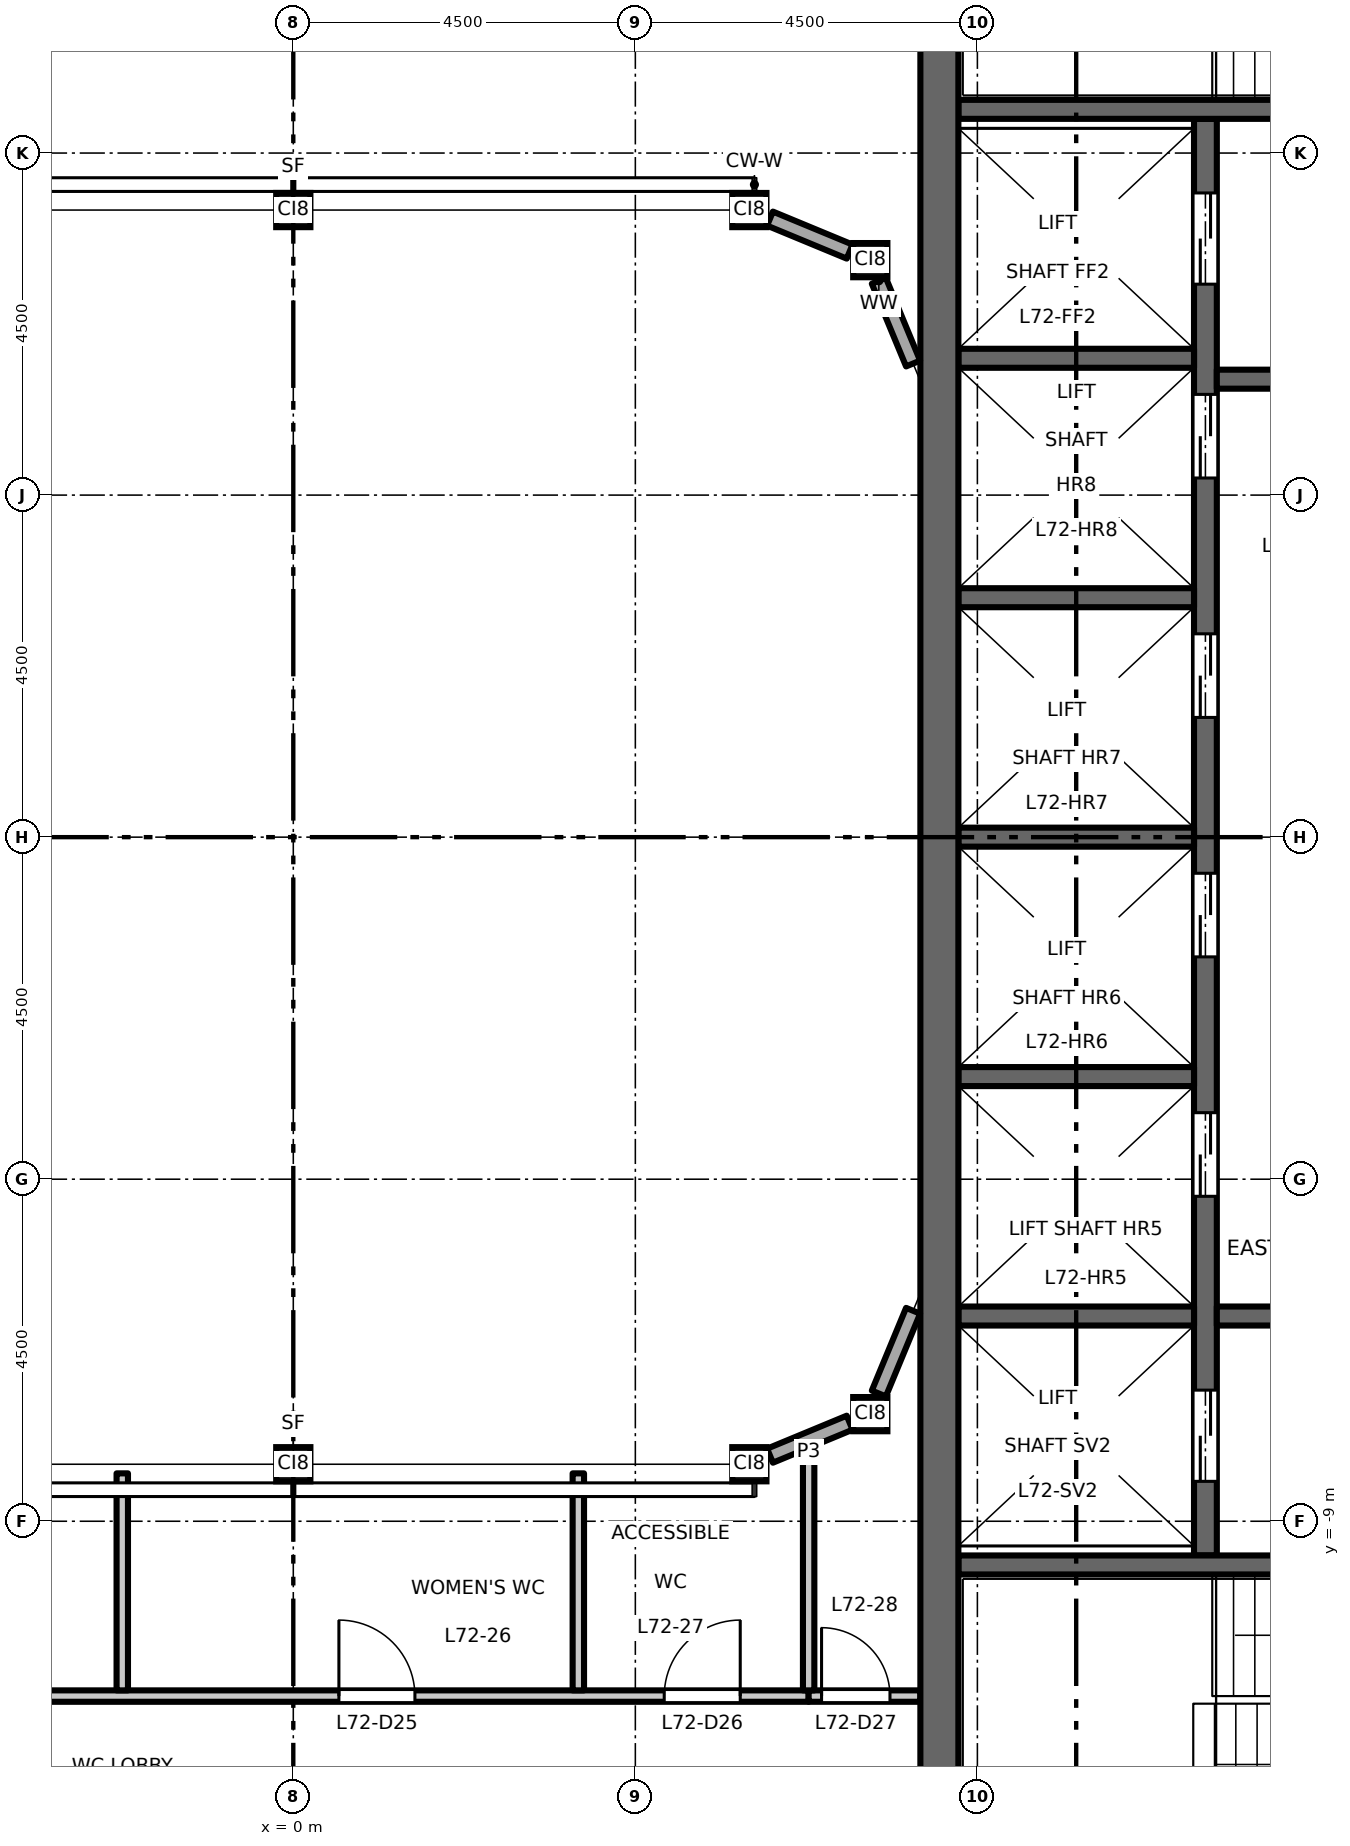
"""IFC4 building model, lengths in metres.
Left out: names, types, materials, properties, quantities, classifications, styles, units other than length and angle.
Written with IfcOpenShell. Run it as: python <this file> out.ifc"""

import sys

from ifc_helpers import new_model, si_unit, direction, frame, frame_2d, origin, origin_2d, place, context, subcontext, project, spatial, rectangle, hollow_rectangle, extrude, element, fill, save


model = new_model("IFC4")
c1 = context("Model", 3, precision=1e-05, world=origin(), true_north=direction((0.0, 1.0)))
c2 = subcontext(c1, "Body", "Model", "MODEL_VIEW")
j1 = project(units=[si_unit("LENGTHUNIT", "METRE"), si_unit("PLANEANGLEUNIT", "RADIAN")], contexts=[c1])
p1 = place(None, origin())
s1 = spatial("IfcSite", under=j1, at=p1, CompositionType="ELEMENT")
p2 = place(p1, origin())
s2 = spatial("IfcBuilding", under=s1, at=p2, CompositionType="ELEMENT")
p3 = place(p2, frame((0.0, 0.0, 334.7)))
s3 = spatial("IfcBuildingStorey", under=s2, at=p3, CompositionType="ELEMENT", Elevation=334.7)
for number, where, z_axis, x_axis in (
    (1, (0.0, -8.25, 0.0), (0.0, 0.0, 1.0), (1.0, 0.0, 0.0)),
    (2, (6.0, -8.25, 0.0), (0.0, 0.0, 1.0), (1.0, 0.0, 0.0)),
    (3, (7.591, -7.591, 0.0), (0.0, 0.0, 1.0), (1.0, 0.0, 0.0)),
    (4, (0.0, 8.25, 0.0), (0.0, 0.0, 1.0), (1.0, 0.0, 0.0)),
    (5, (6.0, 8.25, 0.0), (0.0, 0.0, 1.0), (1.0, 0.0, 0.0)),
    (6, (7.591, 7.591, 0.0), (0.0, 0.0, 1.0), (1.0, 0.0, 0.0)),
):
    element("IfcColumn", number, at=place(p3, frame(where, z_axis=z_axis, x_axis=x_axis)), inside=s3, PredefinedType="COLUMN", context=c2, shape_type="SweptSolid", body=[
        extrude(hollow_rectangle(XDim=0.45, YDim=0.45, WallThickness=0.022, at=origin_2d()), origin(), (0.0, 0.0, 1.0), 4.5),
    ])
p4 = place(p3, frame((12.0, -9.45, 0.0), z_axis=(0.0, 0.0, 1.0), x_axis=(0.0, 1.0, 0.0)))
e7 = element("IfcWall", 7, at=p4, inside=s3, PredefinedType="SHEAR", context=c2, shape_type="SweptSolid", body=[
    extrude(rectangle(XDim=18.9, YDim=0.3, at=frame_2d((9.45, 0.0))), origin(), (0.0, 0.0, 1.0), 4.35),
])
p5 = place(p4, frame((4.725, 0.0, 0.0)))
e8 = element("IfcOpeningElement", 8, at=p5, cuts=e7, PredefinedType="OPENING", context=c2, shape_type="SweptSolid", body=[
    extrude(rectangle(XDim=1.1, YDim=2.1, at=frame_2d((0.55, 1.05))), frame((0.0, 0.16, 0.0), z_axis=(0.0, -1.0, 0.0), x_axis=(1.0, 0.0, 0.0)), (0.0, 0.0, 1.0), 0.32),
])
p6 = place(p4, frame((7.875, 0.0, 0.0)))
e9 = element("IfcOpeningElement", 9, at=p6, cuts=e7, PredefinedType="OPENING", context=c2, shape_type="SweptSolid", body=[
    extrude(rectangle(XDim=1.1, YDim=2.1, at=frame_2d((0.55, 1.05))), frame((0.0, 0.16, 0.0), z_axis=(0.0, -1.0, 0.0), x_axis=(1.0, 0.0, 0.0)), (0.0, 0.0, 1.0), 0.32),
])
p7 = place(p4, frame((11.025, 0.0, 0.0)))
e10 = element("IfcOpeningElement", 10, at=p7, cuts=e7, PredefinedType="OPENING", context=c2, shape_type="SweptSolid", body=[
    extrude(rectangle(XDim=1.1, YDim=2.1, at=frame_2d((0.55, 1.05))), frame((0.0, 0.16, 0.0), z_axis=(0.0, -1.0, 0.0), x_axis=(1.0, 0.0, 0.0)), (0.0, 0.0, 1.0), 0.32),
])
p8 = place(p4, frame((14.175, 0.0, 0.0)))
e11 = element("IfcOpeningElement", 11, at=p8, cuts=e7, PredefinedType="OPENING", context=c2, shape_type="SweptSolid", body=[
    extrude(rectangle(XDim=1.1, YDim=2.1, at=frame_2d((0.55, 1.05))), frame((0.0, 0.16, 0.0), z_axis=(0.0, -1.0, 0.0), x_axis=(1.0, 0.0, 0.0)), (0.0, 0.0, 1.0), 0.32),
])
p9 = place(p4, frame((16.725, 0.0, 0.0)))
e12 = element("IfcOpeningElement", 12, at=p9, cuts=e7, PredefinedType="OPENING", context=c2, shape_type="SweptSolid", body=[
    extrude(rectangle(XDim=1.2, YDim=2.1, at=frame_2d((0.6, 1.05))), frame((0.0, 0.16, 0.0), z_axis=(0.0, -1.0, 0.0), x_axis=(1.0, 0.0, 0.0)), (0.0, 0.0, 1.0), 0.32),
])
p10 = place(p4, frame((0.975, 0.0, 0.0)))
e13 = element("IfcOpeningElement", 13, at=p10, cuts=e7, PredefinedType="OPENING", context=c2, shape_type="SweptSolid", body=[
    extrude(rectangle(XDim=1.2, YDim=2.1, at=frame_2d((0.6, 1.05))), frame((0.0, 0.16, 0.0), z_axis=(0.0, -1.0, 0.0), x_axis=(1.0, 0.0, 0.0)), (0.0, 0.0, 1.0), 0.32),
])
p11 = place(p3, frame((12.15, 6.025, 0.0), z_axis=(0.0, 0.0, 1.0), x_axis=(1.0, 0.0, 0.0)))
e14 = element("IfcWall", 14, at=p11, inside=s3, PredefinedType="SHEAR", context=c2, shape_type="SweptSolid", body=[
    extrude(rectangle(XDim=4.6, YDim=0.25, at=frame_2d((2.3, 0.0))), origin(), (0.0, 0.0, 1.0), 4.35),
])
p12 = place(p11, frame((1.8, 0.0, 0.0)))
e15 = element("IfcOpeningElement", 15, at=p12, cuts=e14, PredefinedType="OPENING", context=c2, shape_type="SweptSolid", body=[
    extrude(rectangle(XDim=1.0, YDim=2.1, at=frame_2d((0.5, 1.05))), frame((0.0, 0.135, 0.0), z_axis=(0.0, -1.0, 0.0), x_axis=(1.0, 0.0, 0.0)), (0.0, 0.0, 1.0), 0.27),
])
p13 = place(p3, frame((12.15, -6.3, 0.0), z_axis=(0.0, 0.0, 1.0), x_axis=(1.0, 0.0, 0.0)))
e16 = element("IfcWall", 16, at=p13, inside=s3, PredefinedType="SHEAR", context=c2, shape_type="SweptSolid", body=[
    extrude(rectangle(XDim=4.6, YDim=0.25, at=frame_2d((2.3, 0.0))), origin(), (0.0, 0.0, 1.0), 4.35),
])
p14 = place(p13, frame((1.8, 0.0, 0.0)))
e17 = element("IfcOpeningElement", 17, at=p14, cuts=e16, PredefinedType="OPENING", context=c2, shape_type="SweptSolid", body=[
    extrude(rectangle(XDim=1.0, YDim=2.1, at=frame_2d((0.5, 1.05))), frame((0.0, 0.135, 0.0), z_axis=(0.0, -1.0, 0.0), x_axis=(1.0, 0.0, 0.0)), (0.0, 0.0, 1.0), 0.27),
])
for number, where, z_axis, x_axis in (
    (18, (8.75, 0.0, 0.0), (0.0, 0.0, 1.0), (1.0, 0.0, 0.0)),
    (19, (8.75, 3.15, 0.0), (0.0, 0.0, 1.0), (1.0, 0.0, 0.0)),
    (20, (8.75, 6.3, 0.0), (0.0, 0.0, 1.0), (1.0, 0.0, 0.0)),
    (21, (8.75, -3.15, 0.0), (0.0, 0.0, 1.0), (1.0, 0.0, 0.0)),
    (22, (8.75, -6.3, 0.0), (0.0, 0.0, 1.0), (1.0, 0.0, 0.0)),
):
    element("IfcWall", number, at=place(p3, frame(where, z_axis=z_axis, x_axis=x_axis)), inside=s3, PredefinedType="SHEAR", context=c2, shape_type="SweptSolid", body=[
        extrude(rectangle(XDim=3.1, YDim=0.25, at=frame_2d((1.55, 0.0))), origin(), (0.0, 0.0, 1.0), 4.35),
    ])
p15 = place(p3, frame((8.75, 9.575, 0.0), z_axis=(0.0, 0.0, 1.0), x_axis=(1.0, 0.0, 0.0)))
e23 = element("IfcWall", 23, at=p15, inside=s3, PredefinedType="SHEAR", context=c2, shape_type="SweptSolid", body=[
    extrude(rectangle(XDim=8.0, YDim=0.25, at=frame_2d((4.0, 0.0))), origin(), (0.0, 0.0, 1.0), 4.35),
])
p16 = place(p15, frame((6.65, 0.0, 0.0)))
e24 = element("IfcOpeningElement", 24, at=p16, cuts=e23, PredefinedType="OPENING", context=c2, shape_type="SweptSolid", body=[
    extrude(rectangle(XDim=1.1, YDim=2.1, at=frame_2d((0.55, 1.05))), frame((0.0, 0.135, 0.0), z_axis=(0.0, -1.0, 0.0), x_axis=(1.0, 0.0, 0.0)), (0.0, 0.0, 1.0), 0.27),
])
p17 = place(p3, frame((8.75, -9.575, 0.0), z_axis=(0.0, 0.0, 1.0), x_axis=(1.0, 0.0, 0.0)))
e25 = element("IfcWall", 25, at=p17, inside=s3, PredefinedType="SHEAR", context=c2, shape_type="SweptSolid", body=[
    extrude(rectangle(XDim=8.0, YDim=0.25, at=frame_2d((4.0, 0.0))), origin(), (0.0, 0.0, 1.0), 4.35),
])
p18 = place(p17, frame((6.65, 0.0, 0.0)))
e26 = element("IfcOpeningElement", 26, at=p18, cuts=e25, PredefinedType="OPENING", context=c2, shape_type="SweptSolid", body=[
    extrude(rectangle(XDim=1.1, YDim=2.1, at=frame_2d((0.55, 1.05))), frame((0.0, 0.135, 0.0), z_axis=(0.0, -1.0, 0.0), x_axis=(1.0, 0.0, 0.0)), (0.0, 0.0, 1.0), 0.27),
])
p19 = place(p3, frame((8.5, -13.0, 0.0), z_axis=(0.0, 0.0, 1.0), x_axis=(0.0, 1.0, 0.0)))
e27 = element("IfcWall", 27, at=p19, inside=s3, PredefinedType="SHEAR", context=c2, shape_type="SweptSolid", body=[
    extrude(rectangle(XDim=26.0, YDim=0.5, at=frame_2d((13.0, 0.0))), origin(), (0.0, 0.0, 1.0), 4.35),
])
p20 = place(p3, frame((6.271, -8.137, 0.0), z_axis=(0.0, 0.0, 1.0), x_axis=(0.923864661962, 0.382719331074, 0.0)))
e28 = element("IfcWall", 28, at=p20, inside=s3, PredefinedType="STANDARD", context=c2, shape_type="SweptSolid", body=[
    extrude(rectangle(XDim=1.134, YDim=0.2, at=frame_2d((0.567, 0.0))), origin(), (0.0, 0.0, 1.0), 4.01),
])
for number, where, z_axis, x_axis in (
    (29, (7.703, -7.319, 0.0), (0.0, 0.0, 1.0), (0.383, 0.924, 0.0)),
    (30, (8.154, 6.231, 0.0), (0.0, 0.0, 1.0), (-0.383, 0.924, 0.0)),
):
    element("IfcWall", number, at=place(p3, frame(where, z_axis=z_axis, x_axis=x_axis)), inside=s3, PredefinedType="STANDARD", context=c2, shape_type="SweptSolid", body=[
        extrude(rectangle(XDim=1.178, YDim=0.2, at=frame_2d((0.589, 0.0))), origin(), (0.0, 0.0, 1.0), 4.01),
    ])
p21 = place(p3, frame((7.319, 7.703, 0.0), z_axis=(0.0, 0.0, 1.0), x_axis=(-0.923864661962, 0.382719331074, 0.0)))
e31 = element("IfcWall", 31, at=p21, inside=s3, PredefinedType="STANDARD", context=c2, shape_type="SweptSolid", body=[
    extrude(rectangle(XDim=1.134, YDim=0.2, at=frame_2d((0.567, 0.0))), origin(), (0.0, 0.0, 1.0), 4.01),
])
p22 = place(p3, frame((-8.25, -11.3, 0.0), z_axis=(0.0, 0.0, 1.0), x_axis=(1.0, 0.0, 0.0)))
e32 = element("IfcWall", 32, at=p22, inside=s3, PredefinedType="PARTITIONING", context=c2, shape_type="SweptSolid", body=[
    extrude(rectangle(XDim=15.03, YDim=0.15, at=frame_2d((7.515, 0.0))), origin(), (0.0, 0.0, 1.0), 4.35),
])
p23 = place(p22, frame((2.6, 0.0, 0.0)))
e33 = element("IfcOpeningElement", 33, at=p23, cuts=e32, PredefinedType="OPENING", context=c2, shape_type="SweptSolid", body=[
    extrude(rectangle(XDim=1.0, YDim=2.1, at=frame_2d((0.5, 1.05))), frame((0.0, 0.085, 0.0), z_axis=(0.0, -1.0, 0.0), x_axis=(1.0, 0.0, 0.0)), (0.0, 0.0, 1.0), 0.17),
])
p24 = place(p22, frame((8.85, 0.0, 0.0)))
e34 = element("IfcOpeningElement", 34, at=p24, cuts=e32, PredefinedType="OPENING", context=c2, shape_type="SweptSolid", body=[
    extrude(rectangle(XDim=1.0, YDim=2.1, at=frame_2d((0.5, 1.05))), frame((0.0, 0.085, 0.0), z_axis=(0.0, -1.0, 0.0), x_axis=(1.0, 0.0, 0.0)), (0.0, 0.0, 1.0), 0.17),
])
p25 = place(p22, frame((13.13, 0.0, 0.0)))
e35 = element("IfcOpeningElement", 35, at=p25, cuts=e32, PredefinedType="OPENING", context=c2, shape_type="SweptSolid", body=[
    extrude(rectangle(XDim=1.0, YDim=2.1, at=frame_2d((0.5, 1.05))), frame((0.0, 0.085, 0.0), z_axis=(0.0, -1.0, 0.0), x_axis=(1.0, 0.0, 0.0)), (0.0, 0.0, 1.0), 0.17),
])
p26 = place(p3, frame((6.78, -11.3, 0.0), z_axis=(0.0, 0.0, 1.0), x_axis=(1.0, 0.0, 0.0)))
e36 = element("IfcWall", 36, at=p26, inside=s3, PredefinedType="PARTITIONING", context=c2, shape_type="SweptSolid", body=[
    extrude(rectangle(XDim=1.47, YDim=0.15, at=frame_2d((0.735, 0.0))), origin(), (0.0, 0.0, 1.0), 4.35),
])
p27 = place(p26, frame((0.17, 0.0, 0.0)))
e37 = element("IfcOpeningElement", 37, at=p27, cuts=e36, PredefinedType="OPENING", context=c2, shape_type="SweptSolid", body=[
    extrude(rectangle(XDim=0.9, YDim=2.1, at=frame_2d((0.45, 1.05))), frame((0.0, 0.085, 0.0), z_axis=(0.0, -1.0, 0.0), x_axis=(1.0, 0.0, 0.0)), (0.0, 0.0, 1.0), 0.17),
])
for number, where, z_axis, x_axis in (
    (38, (-2.25, -11.225, 0.0), (0.0, 0.0, 1.0), (0.0, 1.0, 0.0)),
    (39, (3.75, -11.225, 0.0), (0.0, 0.0, 1.0), (0.0, 1.0, 0.0)),
):
    element("IfcWall", number, at=place(p3, frame(where, z_axis=z_axis, x_axis=x_axis)), inside=s3, PredefinedType="PARTITIONING", context=c2, shape_type="SweptSolid", body=[
        extrude(rectangle(XDim=2.855, YDim=0.15, at=frame_2d((1.427, 0.0))), origin(), (0.0, 0.0, 1.0), 4.35),
    ])
p28 = place(p3, frame((6.78, -11.225, 0.0), z_axis=(0.0, 0.0, 1.0), x_axis=(0.0, 1.0, 0.0)))
e40 = element("IfcWall", 40, at=p28, inside=s3, PredefinedType="PARTITIONING", context=c2, shape_type="SweptSolid", body=[
    extrude(rectangle(XDim=3.138, YDim=0.15, at=frame_2d((1.569, 0.0))), origin(), (0.0, 0.0, 1.0), 4.35),
])
p29 = place(p5, origin())
e41 = element("IfcDoor", 41, at=p29, inside=s3, OperationType="DOUBLE_DOOR_SLIDING", PredefinedType="DOOR", context=c2, shape_type="SweptSolid", body=[
    extrude(rectangle(XDim=1.1, YDim=2.1, at=frame_2d((0.55, 1.05))), frame((0.0, 0.025, 0.0), z_axis=(0.0, -1.0, 0.0), x_axis=(1.0, 0.0, 0.0)), (0.0, 0.0, 1.0), 0.05),
])
fill(e8, e41)
p30 = place(p6, origin())
e42 = element("IfcDoor", 42, at=p30, inside=s3, OperationType="DOUBLE_DOOR_SLIDING", PredefinedType="DOOR", context=c2, shape_type="SweptSolid", body=[
    extrude(rectangle(XDim=1.1, YDim=2.1, at=frame_2d((0.55, 1.05))), frame((0.0, 0.025, 0.0), z_axis=(0.0, -1.0, 0.0), x_axis=(1.0, 0.0, 0.0)), (0.0, 0.0, 1.0), 0.05),
])
fill(e9, e42)
p31 = place(p7, origin())
e43 = element("IfcDoor", 43, at=p31, inside=s3, OperationType="DOUBLE_DOOR_SLIDING", PredefinedType="DOOR", context=c2, shape_type="SweptSolid", body=[
    extrude(rectangle(XDim=1.1, YDim=2.1, at=frame_2d((0.55, 1.05))), frame((0.0, 0.025, 0.0), z_axis=(0.0, -1.0, 0.0), x_axis=(1.0, 0.0, 0.0)), (0.0, 0.0, 1.0), 0.05),
])
fill(e10, e43)
p32 = place(p8, origin())
e44 = element("IfcDoor", 44, at=p32, inside=s3, OperationType="DOUBLE_DOOR_SLIDING", PredefinedType="DOOR", context=c2, shape_type="SweptSolid", body=[
    extrude(rectangle(XDim=1.1, YDim=2.1, at=frame_2d((0.55, 1.05))), frame((0.0, 0.025, 0.0), z_axis=(0.0, -1.0, 0.0), x_axis=(1.0, 0.0, 0.0)), (0.0, 0.0, 1.0), 0.05),
])
fill(e11, e44)
p33 = place(p9, origin())
e45 = element("IfcDoor", 45, at=p33, inside=s3, OperationType="DOUBLE_DOOR_SLIDING", PredefinedType="DOOR", context=c2, shape_type="SweptSolid", body=[
    extrude(rectangle(XDim=1.2, YDim=2.1, at=frame_2d((0.6, 1.05))), frame((0.0, 0.025, 0.0), z_axis=(0.0, -1.0, 0.0), x_axis=(1.0, 0.0, 0.0)), (0.0, 0.0, 1.0), 0.05),
])
fill(e12, e45)
p34 = place(p10, origin())
e46 = element("IfcDoor", 46, at=p34, inside=s3, OperationType="DOUBLE_DOOR_SLIDING", PredefinedType="DOOR", context=c2, shape_type="SweptSolid", body=[
    extrude(rectangle(XDim=1.2, YDim=2.1, at=frame_2d((0.6, 1.05))), frame((0.0, 0.025, 0.0), z_axis=(0.0, -1.0, 0.0), x_axis=(1.0, 0.0, 0.0)), (0.0, 0.0, 1.0), 0.05),
])
fill(e13, e46)
p35 = place(p24, origin())
e47 = element("IfcDoor", 47, at=p35, inside=s3, OperationType="SINGLE_SWING_LEFT", PredefinedType="DOOR", context=c2, shape_type="SweptSolid", body=[
    extrude(rectangle(XDim=1.0, YDim=2.1, at=frame_2d((0.5, 1.05))), frame((0.0, 0.025, 0.0), z_axis=(0.0, -1.0, 0.0), x_axis=(1.0, 0.0, 0.0)), (0.0, 0.0, 1.0), 0.05),
])
fill(e34, e47)
p36 = place(p25, origin())
e48 = element("IfcDoor", 48, at=p36, inside=s3, OperationType="SINGLE_SWING_RIGHT", PredefinedType="DOOR", context=c2, shape_type="SweptSolid", body=[
    extrude(rectangle(XDim=1.0, YDim=2.1, at=frame_2d((0.5, 1.05))), frame((0.0, 0.025, 0.0), z_axis=(0.0, -1.0, 0.0), x_axis=(1.0, 0.0, 0.0)), (0.0, 0.0, 1.0), 0.05),
])
fill(e35, e48)
p37 = place(p27, origin())
e49 = element("IfcDoor", 49, at=p37, inside=s3, OperationType="SINGLE_SWING_LEFT", PredefinedType="DOOR", context=c2, shape_type="SweptSolid", body=[
    extrude(rectangle(XDim=0.9, YDim=2.1, at=frame_2d((0.45, 1.05))), frame((0.0, 0.025, 0.0), z_axis=(0.0, -1.0, 0.0), x_axis=(1.0, 0.0, 0.0)), (0.0, 0.0, 1.0), 0.05),
])
fill(e37, e49)
save(model, sys.argv[1])
